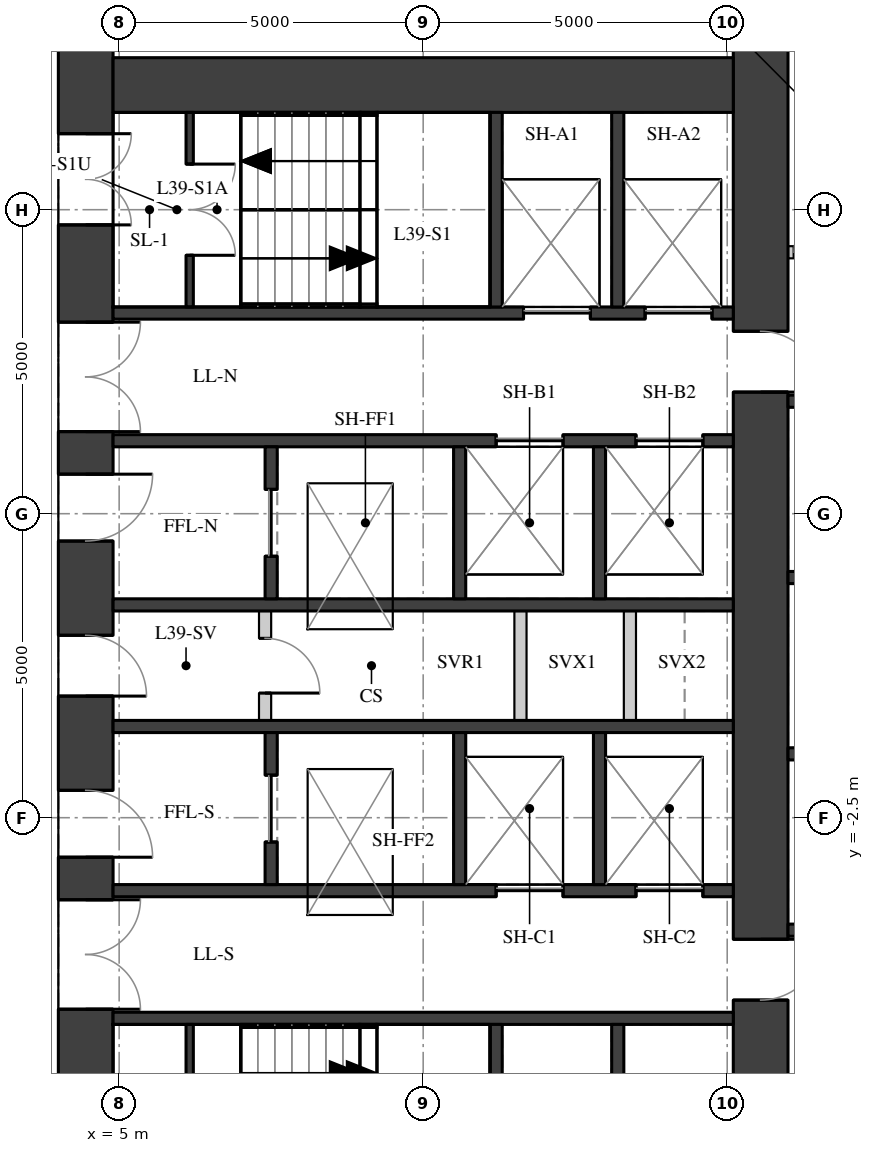
"""IFC4 building model, lengths in metres.
Left out: names, types, materials, properties, quantities, classifications, styles, units other than length and angle.
Written with IfcOpenShell. Run it as: python <this file> out.ifc"""

import sys

from ifc_helpers import new_model, si_unit, direction, frame, frame_2d, origin, place, context, subcontext, project, spatial, rectangle, extrude, element, fill, save


model = new_model("IFC4")
c1 = context("Model", 3, precision=1e-05, world=origin(), true_north=direction((0.0, 1.0)))
c2 = subcontext(c1, "Body", "Model", "MODEL_VIEW")
j1 = project(units=[si_unit("LENGTHUNIT", "METRE"), si_unit("PLANEANGLEUNIT", "RADIAN")], contexts=[c1])
p1 = place(None, origin())
s1 = spatial("IfcSite", under=j1, at=p1, CompositionType="ELEMENT")
p2 = place(p1, origin())
s2 = spatial("IfcBuilding", under=s1, at=p2, CompositionType="ELEMENT")
p3 = place(p2, frame((0.0, 0.0, 139.6)))
s3 = spatial("IfcBuildingStorey", under=s2, at=p3, CompositionType="ELEMENT", Elevation=139.6)
p4 = place(p3, frame((4.45, -11.1, 0.0), z_axis=(0.0, 0.0, 1.0), x_axis=(0.0, 1.0, 0.0)))
e1 = element("IfcWall", 1, at=p4, inside=s3, PredefinedType="SHEAR", context=c2, shape_type="SweptSolid", body=[
    extrude(rectangle(XDim=22.2, YDim=0.9, at=frame_2d((11.1, 0.0))), origin(), (0.0, 0.0, 1.0), 5.22),
])
p5 = place(p4, frame((2.35, 0.0, 0.0)))
e2 = element("IfcOpeningElement", 2, at=p5, cuts=e1, PredefinedType="OPENING", context=c2, shape_type="SweptSolid", body=[
    extrude(rectangle(XDim=1.5, YDim=2.1, at=frame_2d((0.75, 1.05))), frame((0.0, 0.46, 0.0), z_axis=(0.0, -1.0, 0.0), x_axis=(1.0, 0.0, 0.0)), (0.0, 0.0, 1.0), 0.92),
])
p6 = place(p4, frame((5.45, 0.0, 0.0)))
e3 = element("IfcOpeningElement", 3, at=p6, cuts=e1, PredefinedType="OPENING", context=c2, shape_type="SweptSolid", body=[
    extrude(rectangle(XDim=1.8, YDim=2.1, at=frame_2d((0.9, 1.05))), frame((0.0, 0.46, 0.0), z_axis=(0.0, -1.0, 0.0), x_axis=(1.0, 0.0, 0.0)), (0.0, 0.0, 1.0), 0.92),
])
p7 = place(p4, frame((7.95, 0.0, 0.0)))
e4 = element("IfcOpeningElement", 4, at=p7, cuts=e1, PredefinedType="OPENING", context=c2, shape_type="SweptSolid", body=[
    extrude(rectangle(XDim=1.1, YDim=2.1, at=frame_2d((0.55, 1.05))), frame((0.0, 0.46, 0.0), z_axis=(0.0, -1.0, 0.0), x_axis=(1.0, 0.0, 0.0)), (0.0, 0.0, 1.0), 0.92),
])
p8 = place(p4, frame((10.6, 0.0, 0.0)))
e5 = element("IfcOpeningElement", 5, at=p8, cuts=e1, PredefinedType="OPENING", context=c2, shape_type="SweptSolid", body=[
    extrude(rectangle(XDim=1.0, YDim=2.1, at=frame_2d((0.5, 1.05))), frame((0.0, 0.46, 0.0), z_axis=(0.0, -1.0, 0.0), x_axis=(1.0, 0.0, 0.0)), (0.0, 0.0, 1.0), 0.92),
])
p9 = place(p4, frame((13.15, 0.0, 0.0)))
e6 = element("IfcOpeningElement", 6, at=p9, cuts=e1, PredefinedType="OPENING", context=c2, shape_type="SweptSolid", body=[
    extrude(rectangle(XDim=1.1, YDim=2.1, at=frame_2d((0.55, 1.05))), frame((0.0, 0.46, 0.0), z_axis=(0.0, -1.0, 0.0), x_axis=(1.0, 0.0, 0.0)), (0.0, 0.0, 1.0), 0.92),
])
p10 = place(p4, frame((14.95, 0.0, 0.0)))
e7 = element("IfcOpeningElement", 7, at=p10, cuts=e1, PredefinedType="OPENING", context=c2, shape_type="SweptSolid", body=[
    extrude(rectangle(XDim=1.8, YDim=2.1, at=frame_2d((0.9, 1.05))), frame((0.0, 0.46, 0.0), z_axis=(0.0, -1.0, 0.0), x_axis=(1.0, 0.0, 0.0)), (0.0, 0.0, 1.0), 0.92),
])
p11 = place(p4, frame((18.35, 0.0, 0.0)))
e8 = element("IfcOpeningElement", 8, at=p11, cuts=e1, PredefinedType="OPENING", context=c2, shape_type="SweptSolid", body=[
    extrude(rectangle(XDim=1.5, YDim=2.1, at=frame_2d((0.75, 1.05))), frame((0.0, 0.46, 0.0), z_axis=(0.0, -1.0, 0.0), x_axis=(1.0, 0.0, 0.0)), (0.0, 0.0, 1.0), 0.92),
])
p12 = place(p3, frame((15.55, -11.1, 0.0), z_axis=(0.0, 0.0, 1.0), x_axis=(0.0, 1.0, 0.0)))
e9 = element("IfcWall", 9, at=p12, inside=s3, PredefinedType="SHEAR", context=c2, shape_type="SweptSolid", body=[
    extrude(rectangle(XDim=22.2, YDim=0.9, at=frame_2d((11.1, 0.0))), origin(), (0.0, 0.0, 1.0), 5.22),
])
p13 = place(p12, frame((15.6, 0.0, 0.0)))
e10 = element("IfcOpeningElement", 10, at=p13, cuts=e9, PredefinedType="OPENING", context=c2, shape_type="SweptSolid", body=[
    extrude(rectangle(XDim=1.0, YDim=2.1, at=frame_2d((0.5, 1.05))), frame((0.0, 0.46, 0.0), z_axis=(0.0, -1.0, 0.0), x_axis=(1.0, 0.0, 0.0)), (0.0, 0.0, 1.0), 0.92),
])
p14 = place(p12, frame((5.6, 0.0, 0.0)))
e11 = element("IfcOpeningElement", 11, at=p14, cuts=e9, PredefinedType="OPENING", context=c2, shape_type="SweptSolid", body=[
    extrude(rectangle(XDim=1.0, YDim=2.1, at=frame_2d((0.5, 1.05))), frame((0.0, 0.46, 0.0), z_axis=(0.0, -1.0, 0.0), x_axis=(1.0, 0.0, 0.0)), (0.0, 0.0, 1.0), 0.92),
])
p15 = place(p3, frame((4.9, 9.55, 0.0), z_axis=(0.0, 0.0, 1.0), x_axis=(1.0, 0.0, 0.0)))
e12 = element("IfcWall", 12, at=p15, inside=s3, PredefinedType="SHEAR", context=c2, shape_type="SweptSolid", body=[
    extrude(rectangle(XDim=10.2, YDim=0.9, at=frame_2d((5.1, 0.0))), origin(), (0.0, 0.0, 1.0), 5.22),
])
p16 = place(p3, frame((4.9, 5.8, 0.0), z_axis=(0.0, 0.0, 1.0), x_axis=(1.0, 0.0, 0.0)))
e13 = element("IfcWall", 13, at=p16, inside=s3, PredefinedType="SHEAR", context=c2, shape_type="SweptSolid", body=[
    extrude(rectangle(XDim=10.2, YDim=0.2, at=frame_2d((5.1, 0.0))), origin(), (0.0, 0.0, 1.0), 5.22),
])
p17 = place(p16, frame((6.75, 0.0, 0.0)))
e14 = element("IfcOpeningElement", 14, at=p17, cuts=e13, PredefinedType="OPENING", context=c2, shape_type="SweptSolid", body=[
    extrude(rectangle(XDim=1.1, YDim=2.1, at=frame_2d((0.55, 1.05))), frame((0.0, 0.11, 0.0), z_axis=(0.0, -1.0, 0.0), x_axis=(1.0, 0.0, 0.0)), (0.0, 0.0, 1.0), 0.22),
])
p18 = place(p16, frame((8.75, 0.0, 0.0)))
e15 = element("IfcOpeningElement", 15, at=p18, cuts=e13, PredefinedType="OPENING", context=c2, shape_type="SweptSolid", body=[
    extrude(rectangle(XDim=1.1, YDim=2.1, at=frame_2d((0.55, 1.05))), frame((0.0, 0.11, 0.0), z_axis=(0.0, -1.0, 0.0), x_axis=(1.0, 0.0, 0.0)), (0.0, 0.0, 1.0), 0.22),
])
p19 = place(p3, frame((4.9, 3.7, 0.0), z_axis=(0.0, 0.0, 1.0), x_axis=(1.0, 0.0, 0.0)))
e16 = element("IfcWall", 16, at=p19, inside=s3, PredefinedType="SHEAR", context=c2, shape_type="SweptSolid", body=[
    extrude(rectangle(XDim=10.2, YDim=0.2, at=frame_2d((5.1, 0.0))), origin(), (0.0, 0.0, 1.0), 5.22),
])
p20 = place(p19, frame((6.3, 0.0, 0.0)))
e17 = element("IfcOpeningElement", 17, at=p20, cuts=e16, PredefinedType="OPENING", context=c2, shape_type="SweptSolid", body=[
    extrude(rectangle(XDim=1.1, YDim=2.1, at=frame_2d((0.55, 1.05))), frame((0.0, 0.11, 0.0), z_axis=(0.0, -1.0, 0.0), x_axis=(1.0, 0.0, 0.0)), (0.0, 0.0, 1.0), 0.22),
])
p21 = place(p19, frame((8.6, 0.0, 0.0)))
e18 = element("IfcOpeningElement", 18, at=p21, cuts=e16, PredefinedType="OPENING", context=c2, shape_type="SweptSolid", body=[
    extrude(rectangle(XDim=1.1, YDim=2.1, at=frame_2d((0.55, 1.05))), frame((0.0, 0.11, 0.0), z_axis=(0.0, -1.0, 0.0), x_axis=(1.0, 0.0, 0.0)), (0.0, 0.0, 1.0), 0.22),
])
for number, where, z_axis, x_axis in (
    (19, (4.9, 1.0, 0.0), (0.0, 0.0, 1.0), (1.0, 0.0, 0.0)),
    (20, (4.9, -1.0, 0.0), (0.0, 0.0, 1.0), (1.0, 0.0, 0.0)),
):
    element("IfcWall", number, at=place(p3, frame(where, z_axis=z_axis, x_axis=x_axis)), inside=s3, PredefinedType="SHEAR", context=c2, shape_type="SweptSolid", body=[
        extrude(rectangle(XDim=10.2, YDim=0.2, at=frame_2d((5.1, 0.0))), origin(), (0.0, 0.0, 1.0), 5.22),
    ])
p22 = place(p3, frame((4.9, -3.7, 0.0), z_axis=(0.0, 0.0, 1.0), x_axis=(1.0, 0.0, 0.0)))
e21 = element("IfcWall", 21, at=p22, inside=s3, PredefinedType="SHEAR", context=c2, shape_type="SweptSolid", body=[
    extrude(rectangle(XDim=10.2, YDim=0.2, at=frame_2d((5.1, 0.0))), origin(), (0.0, 0.0, 1.0), 5.22),
])
p23 = place(p22, frame((6.3, 0.0, 0.0)))
e22 = element("IfcOpeningElement", 22, at=p23, cuts=e21, PredefinedType="OPENING", context=c2, shape_type="SweptSolid", body=[
    extrude(rectangle(XDim=1.1, YDim=2.1, at=frame_2d((0.55, 1.05))), frame((0.0, 0.11, 0.0), z_axis=(0.0, -1.0, 0.0), x_axis=(1.0, 0.0, 0.0)), (0.0, 0.0, 1.0), 0.22),
])
p24 = place(p22, frame((8.6, 0.0, 0.0)))
e23 = element("IfcOpeningElement", 23, at=p24, cuts=e21, PredefinedType="OPENING", context=c2, shape_type="SweptSolid", body=[
    extrude(rectangle(XDim=1.1, YDim=2.1, at=frame_2d((0.55, 1.05))), frame((0.0, 0.11, 0.0), z_axis=(0.0, -1.0, 0.0), x_axis=(1.0, 0.0, 0.0)), (0.0, 0.0, 1.0), 0.22),
])
p25 = place(p3, frame((4.9, -5.8, 0.0), z_axis=(0.0, 0.0, 1.0), x_axis=(1.0, 0.0, 0.0)))
e24 = element("IfcWall", 24, at=p25, inside=s3, PredefinedType="SHEAR", context=c2, shape_type="SweptSolid", body=[
    extrude(rectangle(XDim=10.2, YDim=0.2, at=frame_2d((5.1, 0.0))), origin(), (0.0, 0.0, 1.0), 5.22),
])
for number, where, z_axis, x_axis in (
    (25, (11.2, 5.9, 0.0), (0.0, 0.0, 1.0), (0.0, 1.0, 0.0)),
    (26, (11.2, -9.1, 0.0), (0.0, 0.0, 1.0), (0.0, 1.0, 0.0)),
    (27, (13.2, 5.9, 0.0), (0.0, 0.0, 1.0), (0.0, 1.0, 0.0)),
    (28, (13.2, -9.1, 0.0), (0.0, 0.0, 1.0), (0.0, 1.0, 0.0)),
):
    element("IfcWall", number, at=place(p3, frame(where, z_axis=z_axis, x_axis=x_axis)), inside=s3, PredefinedType="SHEAR", context=c2, shape_type="SweptSolid", body=[
        extrude(rectangle(XDim=3.2, YDim=0.2, at=frame_2d((1.6, 0.0))), origin(), (0.0, 0.0, 1.0), 5.22),
    ])
p26 = place(p3, frame((7.5, 1.1, 0.0), z_axis=(0.0, 0.0, 1.0), x_axis=(0.0, 1.0, 0.0)))
e29 = element("IfcWall", 29, at=p26, inside=s3, PredefinedType="SHEAR", context=c2, shape_type="SweptSolid", body=[
    extrude(rectangle(XDim=2.5, YDim=0.2, at=frame_2d((1.25, 0.0))), origin(), (0.0, 0.0, 1.0), 5.22),
])
p27 = place(p26, frame((0.7, 0.0, 0.0)))
e30 = element("IfcOpeningElement", 30, at=p27, cuts=e29, PredefinedType="OPENING", context=c2, shape_type="SweptSolid", body=[
    extrude(rectangle(XDim=1.1, YDim=2.1, at=frame_2d((0.55, 1.05))), frame((0.0, 0.11, 0.0), z_axis=(0.0, -1.0, 0.0), x_axis=(1.0, 0.0, 0.0)), (0.0, 0.0, 1.0), 0.22),
])
p28 = place(p3, frame((7.5, -3.6, 0.0), z_axis=(0.0, 0.0, 1.0), x_axis=(0.0, 1.0, 0.0)))
e31 = element("IfcWall", 31, at=p28, inside=s3, PredefinedType="SHEAR", context=c2, shape_type="SweptSolid", body=[
    extrude(rectangle(XDim=2.5, YDim=0.2, at=frame_2d((1.25, 0.0))), origin(), (0.0, 0.0, 1.0), 5.22),
])
p29 = place(p28, frame((0.7, 0.0, 0.0)))
e32 = element("IfcOpeningElement", 32, at=p29, cuts=e31, PredefinedType="OPENING", context=c2, shape_type="SweptSolid", body=[
    extrude(rectangle(XDim=1.1, YDim=2.1, at=frame_2d((0.55, 1.05))), frame((0.0, 0.11, 0.0), z_axis=(0.0, -1.0, 0.0), x_axis=(1.0, 0.0, 0.0)), (0.0, 0.0, 1.0), 0.22),
])
for number, where, z_axis, x_axis in (
    (33, (10.6, 1.1, 0.0), (0.0, 0.0, 1.0), (0.0, 1.0, 0.0)),
    (34, (10.6, -3.6, 0.0), (0.0, 0.0, 1.0), (0.0, 1.0, 0.0)),
    (35, (12.9, 1.1, 0.0), (0.0, 0.0, 1.0), (0.0, 1.0, 0.0)),
    (36, (12.9, -3.6, 0.0), (0.0, 0.0, 1.0), (0.0, 1.0, 0.0)),
):
    element("IfcWall", number, at=place(p3, frame(where, z_axis=z_axis, x_axis=x_axis)), inside=s3, PredefinedType="SHEAR", context=c2, shape_type="SweptSolid", body=[
        extrude(rectangle(XDim=2.5, YDim=0.2, at=frame_2d((1.25, 0.0))), origin(), (0.0, 0.0, 1.0), 5.22),
    ])
p30 = place(p3, frame((6.16, 5.9, 0.0), z_axis=(0.0, 0.0, 1.0), x_axis=(0.0, 1.0, 0.0)))
e37 = element("IfcWall", 37, at=p30, inside=s3, PredefinedType="SHEAR", context=c2, shape_type="SweptSolid", body=[
    extrude(rectangle(XDim=3.2, YDim=0.12, at=frame_2d((1.6, 0.0))), origin(), (0.0, 0.0, 1.0), 2.378),
])
p31 = place(p30, frame((0.85, 0.0, 0.0)))
e38 = element("IfcOpeningElement", 38, at=p31, cuts=e37, PredefinedType="OPENING", context=c2, shape_type="SweptSolid", body=[
    extrude(rectangle(XDim=1.5, YDim=2.1, at=frame_2d((0.75, 1.05))), frame((0.0, 0.07, 0.0), z_axis=(0.0, -1.0, 0.0), x_axis=(1.0, 0.0, 0.0)), (0.0, 0.0, 1.0), 0.14),
])
p32 = place(p3, frame((6.16, -9.1, 0.0), z_axis=(0.0, 0.0, 1.0), x_axis=(0.0, 1.0, 0.0)))
e39 = element("IfcWall", 39, at=p32, inside=s3, PredefinedType="SHEAR", context=c2, shape_type="SweptSolid", body=[
    extrude(rectangle(XDim=3.2, YDim=0.12, at=frame_2d((1.6, 0.0))), origin(), (0.0, 0.0, 1.0), 2.378),
])
p33 = place(p32, frame((0.85, 0.0, 0.0)))
e40 = element("IfcOpeningElement", 40, at=p33, cuts=e39, PredefinedType="OPENING", context=c2, shape_type="SweptSolid", body=[
    extrude(rectangle(XDim=1.5, YDim=2.1, at=frame_2d((0.75, 1.05))), frame((0.0, 0.07, 0.0), z_axis=(0.0, -1.0, 0.0), x_axis=(1.0, 0.0, 0.0)), (0.0, 0.0, 1.0), 0.14),
])
p34 = place(p3, frame((7.4, -0.9, 0.0), z_axis=(0.0, 0.0, 1.0), x_axis=(0.0, 1.0, 0.0)))
e41 = element("IfcWall", 41, at=p34, inside=s3, PredefinedType="PARTITIONING", context=c2, shape_type="SweptSolid", body=[
    extrude(rectangle(XDim=1.8, YDim=0.2, at=frame_2d((0.9, 0.0))), origin(), (0.0, 0.0, 1.0), 5.22),
])
p35 = place(p34, frame((0.45, 0.0, 0.0)))
e42 = element("IfcOpeningElement", 42, at=p35, cuts=e41, PredefinedType="OPENING", context=c2, shape_type="SweptSolid", body=[
    extrude(rectangle(XDim=0.9, YDim=2.1, at=frame_2d((0.45, 1.05))), frame((0.0, 0.11, 0.0), z_axis=(0.0, -1.0, 0.0), x_axis=(1.0, 0.0, 0.0)), (0.0, 0.0, 1.0), 0.22),
])
for number, where, z_axis, x_axis in (
    (43, (11.6, -0.9, 0.0), (0.0, 0.0, 1.0), (0.0, 1.0, 0.0)),
    (44, (13.4, -0.9, 0.0), (0.0, 0.0, 1.0), (0.0, 1.0, 0.0)),
):
    element("IfcWall", number, at=place(p3, frame(where, z_axis=z_axis, x_axis=x_axis)), inside=s3, PredefinedType="PARTITIONING", context=c2, shape_type="SweptSolid", body=[
        extrude(rectangle(XDim=1.8, YDim=0.2, at=frame_2d((0.9, 0.0))), origin(), (0.0, 0.0, 1.0), 5.22),
    ])
for number, where, z_axis, x_axis in (
    (45, (16.0, -4.35, 0.0), (0.0, 0.0, 1.0), (1.0, 0.0, 0.0)),
    (46, (16.0, -1.45, 0.0), (0.0, 0.0, 1.0), (1.0, 0.0, 0.0)),
    (47, (16.0, 1.45, 0.0), (0.0, 0.0, 1.0), (1.0, 0.0, 0.0)),
    (48, (16.0, 4.35, 0.0), (0.0, 0.0, 1.0), (1.0, 0.0, 0.0)),
):
    element("IfcWall", number, at=place(p3, frame(where, z_axis=z_axis, x_axis=x_axis)), inside=s3, PredefinedType="SHEAR", context=c2, shape_type="SweptSolid", body=[
        extrude(rectangle(XDim=2.3, YDim=0.2, at=frame_2d((1.15, 0.0))), origin(), (0.0, 0.0, 1.0), 5.22),
    ])
p36 = place(p3, frame((16.0, 6.8, 0.0), z_axis=(0.0, 0.0, 1.0), x_axis=(1.0, 0.0, 0.0)))
e49 = element("IfcWall", 49, at=p36, inside=s3, PredefinedType="PARTITIONING", context=c2, shape_type="SweptSolid", body=[
    extrude(rectangle(XDim=2.3, YDim=0.2, at=frame_2d((1.15, 0.0))), origin(), (0.0, 0.0, 1.0), 5.22),
])
p37 = place(p36, frame((0.1, 0.0, 0.0)))
e50 = element("IfcOpeningElement", 50, at=p37, cuts=e49, PredefinedType="OPENING", context=c2, shape_type="SweptSolid", body=[
    extrude(rectangle(XDim=0.9, YDim=2.1, at=frame_2d((0.45, 1.05))), frame((0.0, 0.11, 0.0), z_axis=(0.0, -1.0, 0.0), x_axis=(1.0, 0.0, 0.0)), (0.0, 0.0, 1.0), 0.22),
])
p38 = place(p6, origin())
e51 = element("IfcDoor", 51, at=p38, inside=s3, OperationType="DOUBLE_DOOR_SINGLE_SWING", PredefinedType="DOOR", context=c2, shape_type="SweptSolid", body=[
    extrude(rectangle(XDim=1.8, YDim=2.1, at=frame_2d((0.9, 1.05))), frame((0.0, 0.025, 0.0), z_axis=(0.0, -1.0, 0.0), x_axis=(1.0, 0.0, 0.0)), (0.0, 0.0, 1.0), 0.05),
])
fill(e3, e51)
p39 = place(p7, origin())
e52 = element("IfcDoor", 52, at=p39, inside=s3, OperationType="SINGLE_SWING_RIGHT", PredefinedType="DOOR", context=c2, shape_type="SweptSolid", body=[
    extrude(rectangle(XDim=1.1, YDim=2.1, at=frame_2d((0.55, 1.05))), frame((0.0, 0.025, 0.0), z_axis=(0.0, -1.0, 0.0), x_axis=(1.0, 0.0, 0.0)), (0.0, 0.0, 1.0), 0.05),
])
fill(e4, e52)
p40 = place(p8, origin())
e53 = element("IfcDoor", 53, at=p40, inside=s3, OperationType="SINGLE_SWING_RIGHT", PredefinedType="DOOR", context=c2, shape_type="SweptSolid", body=[
    extrude(rectangle(XDim=1.0, YDim=2.1, at=frame_2d((0.5, 1.05))), frame((0.0, 0.025, 0.0), z_axis=(0.0, -1.0, 0.0), x_axis=(1.0, 0.0, 0.0)), (0.0, 0.0, 1.0), 0.05),
])
fill(e5, e53)
p41 = place(p9, origin())
e54 = element("IfcDoor", 54, at=p41, inside=s3, OperationType="SINGLE_SWING_LEFT", PredefinedType="DOOR", context=c2, shape_type="SweptSolid", body=[
    extrude(rectangle(XDim=1.1, YDim=2.1, at=frame_2d((0.55, 1.05))), frame((0.0, 0.025, 0.0), z_axis=(0.0, -1.0, 0.0), x_axis=(1.0, 0.0, 0.0)), (0.0, 0.0, 1.0), 0.05),
])
fill(e6, e54)
p42 = place(p10, origin())
e55 = element("IfcDoor", 55, at=p42, inside=s3, OperationType="DOUBLE_DOOR_SINGLE_SWING", PredefinedType="DOOR", context=c2, shape_type="SweptSolid", body=[
    extrude(rectangle(XDim=1.8, YDim=2.1, at=frame_2d((0.9, 1.05))), frame((0.0, 0.025, 0.0), z_axis=(0.0, -1.0, 0.0), x_axis=(1.0, 0.0, 0.0)), (0.0, 0.0, 1.0), 0.05),
])
fill(e7, e55)
p43 = place(p11, origin())
e56 = element("IfcDoor", 56, at=p43, inside=s3, OperationType="DOUBLE_DOOR_SINGLE_SWING", PredefinedType="DOOR", context=c2, shape_type="SweptSolid", body=[
    extrude(rectangle(XDim=1.5, YDim=2.1, at=frame_2d((0.75, 1.05))), frame((0.0, 0.025, 0.0), z_axis=(0.0, -1.0, 0.0), x_axis=(1.0, 0.0, 0.0)), (0.0, 0.0, 1.0), 0.05),
])
fill(e8, e56)
p44 = place(p31, origin())
e57 = element("IfcDoor", 57, at=p44, inside=s3, OperationType="DOUBLE_DOOR_SINGLE_SWING", PredefinedType="DOOR", context=c2, shape_type="SweptSolid", body=[
    extrude(rectangle(XDim=1.5, YDim=2.1, at=frame_2d((0.75, 1.05))), frame((0.0, 0.025, 0.0), z_axis=(0.0, -1.0, 0.0), x_axis=(1.0, 0.0, 0.0)), (0.0, 0.0, 1.0), 0.05),
])
fill(e38, e57)
p45 = place(p17, origin())
e58 = element("IfcDoor", 58, at=p45, inside=s3, OperationType="DOUBLE_DOOR_SLIDING", PredefinedType="DOOR", context=c2, shape_type="SweptSolid", body=[
    extrude(rectangle(XDim=1.1, YDim=2.1, at=frame_2d((0.55, 1.05))), frame((0.0, 0.025, 0.0), z_axis=(0.0, -1.0, 0.0), x_axis=(1.0, 0.0, 0.0)), (0.0, 0.0, 1.0), 0.05),
])
fill(e14, e58)
p46 = place(p18, origin())
e59 = element("IfcDoor", 59, at=p46, inside=s3, OperationType="DOUBLE_DOOR_SLIDING", PredefinedType="DOOR", context=c2, shape_type="SweptSolid", body=[
    extrude(rectangle(XDim=1.1, YDim=2.1, at=frame_2d((0.55, 1.05))), frame((0.0, 0.025, 0.0), z_axis=(0.0, -1.0, 0.0), x_axis=(1.0, 0.0, 0.0)), (0.0, 0.0, 1.0), 0.05),
])
fill(e15, e59)
p47 = place(p20, origin())
e60 = element("IfcDoor", 60, at=p47, inside=s3, OperationType="DOUBLE_DOOR_SLIDING", PredefinedType="DOOR", context=c2, shape_type="SweptSolid", body=[
    extrude(rectangle(XDim=1.1, YDim=2.1, at=frame_2d((0.55, 1.05))), frame((0.0, 0.025, 0.0), z_axis=(0.0, -1.0, 0.0), x_axis=(1.0, 0.0, 0.0)), (0.0, 0.0, 1.0), 0.05),
])
fill(e17, e60)
p48 = place(p21, origin())
e61 = element("IfcDoor", 61, at=p48, inside=s3, OperationType="DOUBLE_DOOR_SLIDING", PredefinedType="DOOR", context=c2, shape_type="SweptSolid", body=[
    extrude(rectangle(XDim=1.1, YDim=2.1, at=frame_2d((0.55, 1.05))), frame((0.0, 0.025, 0.0), z_axis=(0.0, -1.0, 0.0), x_axis=(1.0, 0.0, 0.0)), (0.0, 0.0, 1.0), 0.05),
])
fill(e18, e61)
p49 = place(p23, origin())
e62 = element("IfcDoor", 62, at=p49, inside=s3, OperationType="DOUBLE_DOOR_SLIDING", PredefinedType="DOOR", context=c2, shape_type="SweptSolid", body=[
    extrude(rectangle(XDim=1.1, YDim=2.1, at=frame_2d((0.55, 1.05))), frame((0.0, 0.025, 0.0), z_axis=(0.0, -1.0, 0.0), x_axis=(1.0, 0.0, 0.0)), (0.0, 0.0, 1.0), 0.05),
])
fill(e22, e62)
p50 = place(p24, origin())
e63 = element("IfcDoor", 63, at=p50, inside=s3, OperationType="DOUBLE_DOOR_SLIDING", PredefinedType="DOOR", context=c2, shape_type="SweptSolid", body=[
    extrude(rectangle(XDim=1.1, YDim=2.1, at=frame_2d((0.55, 1.05))), frame((0.0, 0.025, 0.0), z_axis=(0.0, -1.0, 0.0), x_axis=(1.0, 0.0, 0.0)), (0.0, 0.0, 1.0), 0.05),
])
fill(e23, e63)
p51 = place(p27, origin())
e64 = element("IfcDoor", 64, at=p51, inside=s3, OperationType="DOUBLE_DOOR_SLIDING", PredefinedType="DOOR", context=c2, shape_type="SweptSolid", body=[
    extrude(rectangle(XDim=1.1, YDim=2.1, at=frame_2d((0.55, 1.05))), frame((0.0, 0.025, 0.0), z_axis=(0.0, -1.0, 0.0), x_axis=(1.0, 0.0, 0.0)), (0.0, 0.0, 1.0), 0.05),
])
fill(e30, e64)
p52 = place(p29, origin())
e65 = element("IfcDoor", 65, at=p52, inside=s3, OperationType="DOUBLE_DOOR_SLIDING", PredefinedType="DOOR", context=c2, shape_type="SweptSolid", body=[
    extrude(rectangle(XDim=1.1, YDim=2.1, at=frame_2d((0.55, 1.05))), frame((0.0, 0.025, 0.0), z_axis=(0.0, -1.0, 0.0), x_axis=(1.0, 0.0, 0.0)), (0.0, 0.0, 1.0), 0.05),
])
fill(e32, e65)
p53 = place(p35, origin())
e66 = element("IfcDoor", 66, at=p53, inside=s3, OperationType="SINGLE_SWING_RIGHT", PredefinedType="DOOR", context=c2, shape_type="SweptSolid", body=[
    extrude(rectangle(XDim=0.9, YDim=2.1, at=frame_2d((0.45, 1.05))), frame((0.0, 0.025, 0.0), z_axis=(0.0, -1.0, 0.0), x_axis=(1.0, 0.0, 0.0)), (0.0, 0.0, 1.0), 0.05),
])
fill(e42, e66)
p54 = place(p13, origin())
e67 = element("IfcDoor", 67, at=p54, inside=s3, OperationType="SINGLE_SWING_RIGHT", PredefinedType="DOOR", context=c2, shape_type="SweptSolid", body=[
    extrude(rectangle(XDim=1.0, YDim=2.1, at=frame_2d((0.5, 1.05))), frame((0.0, 0.025, 0.0), z_axis=(0.0, -1.0, 0.0), x_axis=(1.0, 0.0, 0.0)), (0.0, 0.0, 1.0), 0.05),
])
fill(e10, e67)
p55 = place(p14, origin())
e68 = element("IfcDoor", 68, at=p55, inside=s3, OperationType="SINGLE_SWING_LEFT", PredefinedType="DOOR", context=c2, shape_type="SweptSolid", body=[
    extrude(rectangle(XDim=1.0, YDim=2.1, at=frame_2d((0.5, 1.05))), frame((0.0, 0.025, 0.0), z_axis=(0.0, -1.0, 0.0), x_axis=(1.0, 0.0, 0.0)), (0.0, 0.0, 1.0), 0.05),
])
fill(e11, e68)
save(model, sys.argv[1])
